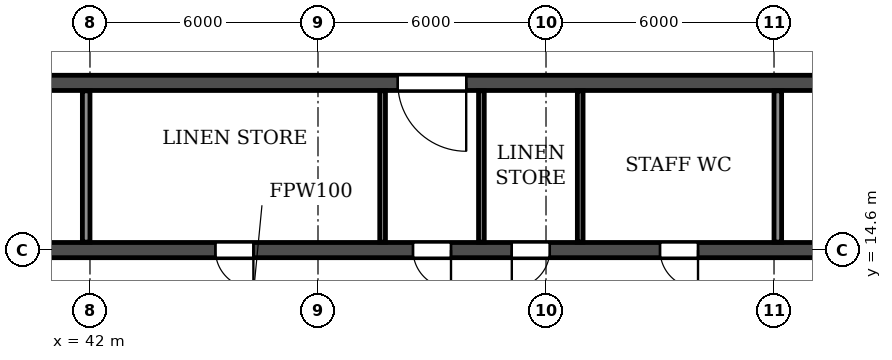
"""IFC4 building model, lengths in metres.
Left out: names, types, materials, properties, quantities, classifications, styles, units other than length and angle.
Written with IfcOpenShell. Run it as: python <this file> out.ifc"""

import sys

from ifc_helpers import new_model, si_unit, direction, frame, frame_2d, origin, place, context, subcontext, project, spatial, rectangle, extrude, element, fill, save


model = new_model("IFC4")
c1 = context("Model", 3, precision=1e-05, world=origin(), true_north=direction((0.0, 1.0)))
c2 = subcontext(c1, "Body", "Model", "MODEL_VIEW")
j1 = project(units=[si_unit("LENGTHUNIT", "METRE"), si_unit("PLANEANGLEUNIT", "RADIAN")], contexts=[c1])
p1 = place(None, origin())
s1 = spatial("IfcSite", under=j1, at=p1, CompositionType="ELEMENT")
p2 = place(p1, origin())
s2 = spatial("IfcBuilding", under=s1, at=p2, CompositionType="ELEMENT")
p3 = place(p2, frame((0.0, 0.0, 208.2)))
s3 = spatial("IfcBuildingStorey", under=s2, at=p3, CompositionType="ELEMENT", Elevation=208.2)
p4 = place(p3, frame((18.2, 14.6, 0.0), z_axis=(0.0, 0.0, 1.0), x_axis=(1.0, 0.0, 0.0)))
e1 = element("IfcWall", 1, at=p4, inside=s3, PredefinedType="SOLIDWALL", context=c2, shape_type="SweptSolid", body=[
    extrude(rectangle(XDim=65.6, YDim=0.4, at=frame_2d((32.8, 0.0))), origin(), (0.0, 0.0, 1.0), 3.0),
])
p5 = place(p4, frame((0.7, 0.0, 0.0)))
e2 = element("IfcOpeningElement", 2, at=p5, cuts=e1, PredefinedType="OPENING", context=c2, shape_type="SweptSolid", body=[
    extrude(rectangle(XDim=1.0, YDim=2.1, at=frame_2d((0.5, 1.05))), frame((0.0, 0.21, 0.0), z_axis=(0.0, -1.0, 0.0), x_axis=(1.0, 0.0, 0.0)), (0.0, 0.0, 1.0), 0.42),
])
p6 = place(p4, frame((8.6, 0.0, 0.0)))
e3 = element("IfcOpeningElement", 3, at=p6, cuts=e1, PredefinedType="OPENING", context=c2, shape_type="SweptSolid", body=[
    extrude(rectangle(XDim=1.0, YDim=2.1, at=frame_2d((0.5, 1.05))), frame((0.0, 0.21, 0.0), z_axis=(0.0, -1.0, 0.0), x_axis=(1.0, 0.0, 0.0)), (0.0, 0.0, 1.0), 0.42),
])
p7 = place(p4, frame((13.2, 0.0, 0.0)))
e4 = element("IfcOpeningElement", 4, at=p7, cuts=e1, PredefinedType="OPENING", context=c2, shape_type="SweptSolid", body=[
    extrude(rectangle(XDim=1.0, YDim=2.1, at=frame_2d((0.5, 1.05))), frame((0.0, 0.21, 0.0), z_axis=(0.0, -1.0, 0.0), x_axis=(1.0, 0.0, 0.0)), (0.0, 0.0, 1.0), 0.42),
])
p8 = place(p4, frame((27.1, 0.0, 0.0)))
e5 = element("IfcOpeningElement", 5, at=p8, cuts=e1, PredefinedType="OPENING", context=c2, shape_type="SweptSolid", body=[
    extrude(rectangle(XDim=1.0, YDim=2.1, at=frame_2d((0.5, 1.05))), frame((0.0, 0.21, 0.0), z_axis=(0.0, -1.0, 0.0), x_axis=(1.0, 0.0, 0.0)), (0.0, 0.0, 1.0), 0.42),
])
p9 = place(p4, frame((32.3, 0.0, 0.0)))
e6 = element("IfcOpeningElement", 6, at=p9, cuts=e1, PredefinedType="OPENING", context=c2, shape_type="SweptSolid", body=[
    extrude(rectangle(XDim=1.0, YDim=2.1, at=frame_2d((0.5, 1.05))), frame((0.0, 0.21, 0.0), z_axis=(0.0, -1.0, 0.0), x_axis=(1.0, 0.0, 0.0)), (0.0, 0.0, 1.0), 0.42),
])
p10 = place(p4, frame((34.9, 0.0, 0.0)))
e7 = element("IfcOpeningElement", 7, at=p10, cuts=e1, PredefinedType="OPENING", context=c2, shape_type="SweptSolid", body=[
    extrude(rectangle(XDim=1.0, YDim=2.1, at=frame_2d((0.5, 1.05))), frame((0.0, 0.21, 0.0), z_axis=(0.0, -1.0, 0.0), x_axis=(1.0, 0.0, 0.0)), (0.0, 0.0, 1.0), 0.42),
])
p11 = place(p4, frame((38.8, 0.0, 0.0)))
e8 = element("IfcOpeningElement", 8, at=p11, cuts=e1, PredefinedType="OPENING", context=c2, shape_type="SweptSolid", body=[
    extrude(rectangle(XDim=1.0, YDim=2.1, at=frame_2d((0.5, 1.05))), frame((0.0, 0.21, 0.0), z_axis=(0.0, -1.0, 0.0), x_axis=(1.0, 0.0, 0.0)), (0.0, 0.0, 1.0), 0.42),
])
p12 = place(p4, frame((51.4, 0.0, 0.0)))
e9 = element("IfcOpeningElement", 9, at=p12, cuts=e1, PredefinedType="OPENING", context=c2, shape_type="SweptSolid", body=[
    extrude(rectangle(XDim=1.0, YDim=2.1, at=frame_2d((0.5, 1.05))), frame((0.0, 0.21, 0.0), z_axis=(0.0, -1.0, 0.0), x_axis=(1.0, 0.0, 0.0)), (0.0, 0.0, 1.0), 0.42),
])
p13 = place(p4, frame((56.0, 0.0, 0.0)))
e10 = element("IfcOpeningElement", 10, at=p13, cuts=e1, PredefinedType="OPENING", context=c2, shape_type="SweptSolid", body=[
    extrude(rectangle(XDim=1.0, YDim=2.1, at=frame_2d((0.5, 1.05))), frame((0.0, 0.21, 0.0), z_axis=(0.0, -1.0, 0.0), x_axis=(1.0, 0.0, 0.0)), (0.0, 0.0, 1.0), 0.42),
])
p14 = place(p4, frame((63.9, 0.0, 0.0)))
e11 = element("IfcOpeningElement", 11, at=p14, cuts=e1, PredefinedType="OPENING", context=c2, shape_type="SweptSolid", body=[
    extrude(rectangle(XDim=1.0, YDim=2.1, at=frame_2d((0.5, 1.05))), frame((0.0, 0.21, 0.0), z_axis=(0.0, -1.0, 0.0), x_axis=(1.0, 0.0, 0.0)), (0.0, 0.0, 1.0), 0.42),
])
p15 = place(p3, frame((33.925, 19.0, 0.0), z_axis=(0.0, 0.0, 1.0), x_axis=(1.0, 0.0, 0.0)))
e12 = element("IfcWall", 12, at=p15, inside=s3, PredefinedType="SOLIDWALL", context=c2, shape_type="SweptSolid", body=[
    extrude(rectangle(XDim=34.15, YDim=0.4, at=frame_2d((17.075, 0.0))), origin(), (0.0, 0.0, 1.0), 3.0),
])
p16 = place(p15, frame((16.175, 0.0, 0.0)))
e13 = element("IfcOpeningElement", 13, at=p16, cuts=e12, PredefinedType="OPENING", context=c2, shape_type="SweptSolid", body=[
    extrude(rectangle(XDim=1.8, YDim=2.1, at=frame_2d((0.9, 1.05))), frame((0.0, 0.21, 0.0), z_axis=(0.0, -1.0, 0.0), x_axis=(1.0, 0.0, 0.0)), (0.0, 0.0, 1.0), 0.42),
])
p17 = place(p15, frame((1.525, 0.0, 0.0)))
e14 = element("IfcOpeningElement", 14, at=p17, cuts=e12, PredefinedType="OPENING", context=c2, shape_type="SweptSolid", body=[
    extrude(rectangle(XDim=1.8, YDim=2.1, at=frame_2d((0.9, 1.05))), frame((0.0, 0.21, 0.0), z_axis=(0.0, -1.0, 0.0), x_axis=(1.0, 0.0, 0.0)), (0.0, 0.0, 1.0), 0.42),
])
p18 = place(p15, frame((30.825, 0.0, 0.0)))
e15 = element("IfcOpeningElement", 15, at=p18, cuts=e12, PredefinedType="OPENING", context=c2, shape_type="SweptSolid", body=[
    extrude(rectangle(XDim=1.8, YDim=2.1, at=frame_2d((0.9, 1.05))), frame((0.0, 0.21, 0.0), z_axis=(0.0, -1.0, 0.0), x_axis=(1.0, 0.0, 0.0)), (0.0, 0.0, 1.0), 0.42),
])
for number, where, z_axis, x_axis in (
    (16, (49.7, 14.81, 0.0), (0.0, 0.0, 1.0), (0.0, 1.0, 0.0)),
    (17, (52.3, 14.81, 0.0), (0.0, 0.0, 1.0), (0.0, 1.0, 0.0)),
    (18, (54.9, 14.81, 0.0), (0.0, 0.0, 1.0), (0.0, 1.0, 0.0)),
):
    element("IfcWall", number, at=place(p3, frame(where, z_axis=z_axis, x_axis=x_axis)), inside=s3, PredefinedType="PARTITIONING", context=c2, shape_type="SweptSolid", body=[
        extrude(rectangle(XDim=3.98, YDim=0.15, at=frame_2d((1.99, 0.0))), origin(), (0.0, 0.0, 1.0), 3.0),
    ])
for number, where, z_axis, x_axis in (
    (19, (41.9, 14.81, 0.0), (0.0, 0.0, 1.0), (0.0, 1.0, 0.0)),
    (20, (60.1, 14.81, 0.0), (0.0, 0.0, 1.0), (0.0, 1.0, 0.0)),
):
    element("IfcWall", number, at=place(p3, frame(where, z_axis=z_axis, x_axis=x_axis)), inside=s3, PredefinedType="PARTITIONING", context=c2, shape_type="SweptSolid", body=[
        extrude(rectangle(XDim=3.98, YDim=0.2, at=frame_2d((1.99, 0.0))), origin(), (0.0, 0.0, 1.0), 3.0),
    ])
p19 = place(p8, frame((1.0, 0.0, 0.0), z_axis=(0.0, 0.0, 1.0), x_axis=(-1.0, 0.0, 0.0)))
e21 = element("IfcDoor", 21, at=p19, inside=s3, OperationType="SINGLE_SWING_LEFT", PredefinedType="DOOR", context=c2, shape_type="SweptSolid", body=[
    extrude(rectangle(XDim=1.0, YDim=2.1, at=frame_2d((0.5, 1.05))), frame((0.0, 0.025, 0.0), z_axis=(0.0, -1.0, 0.0), x_axis=(1.0, 0.0, 0.0)), (0.0, 0.0, 1.0), 0.05),
])
fill(e5, e21)
p20 = place(p9, frame((1.0, 0.0, 0.0), z_axis=(0.0, 0.0, 1.0), x_axis=(-1.0, 0.0, 0.0)))
e22 = element("IfcDoor", 22, at=p20, inside=s3, OperationType="SINGLE_SWING_LEFT", PredefinedType="DOOR", context=c2, shape_type="SweptSolid", body=[
    extrude(rectangle(XDim=1.0, YDim=2.1, at=frame_2d((0.5, 1.05))), frame((0.0, 0.025, 0.0), z_axis=(0.0, -1.0, 0.0), x_axis=(1.0, 0.0, 0.0)), (0.0, 0.0, 1.0), 0.05),
])
fill(e6, e22)
p21 = place(p10, frame((1.0, 0.0, 0.0), z_axis=(0.0, 0.0, 1.0), x_axis=(-1.0, 0.0, 0.0)))
e23 = element("IfcDoor", 23, at=p21, inside=s3, OperationType="SINGLE_SWING_RIGHT", PredefinedType="DOOR", context=c2, shape_type="SweptSolid", body=[
    extrude(rectangle(XDim=1.0, YDim=2.1, at=frame_2d((0.5, 1.05))), frame((0.0, 0.025, 0.0), z_axis=(0.0, -1.0, 0.0), x_axis=(1.0, 0.0, 0.0)), (0.0, 0.0, 1.0), 0.05),
])
fill(e7, e23)
p22 = place(p11, frame((1.0, 0.0, 0.0), z_axis=(0.0, 0.0, 1.0), x_axis=(-1.0, 0.0, 0.0)))
e24 = element("IfcDoor", 24, at=p22, inside=s3, OperationType="SINGLE_SWING_LEFT", PredefinedType="DOOR", context=c2, shape_type="SweptSolid", body=[
    extrude(rectangle(XDim=1.0, YDim=2.1, at=frame_2d((0.5, 1.05))), frame((0.0, 0.025, 0.0), z_axis=(0.0, -1.0, 0.0), x_axis=(1.0, 0.0, 0.0)), (0.0, 0.0, 1.0), 0.05),
])
fill(e8, e24)
p23 = place(p16, frame((1.8, 0.0, 0.0), z_axis=(0.0, 0.0, 1.0), x_axis=(-1.0, 0.0, 0.0)))
e25 = element("IfcDoor", 25, at=p23, inside=s3, OperationType="DOUBLE_DOOR_SINGLE_SWING", PredefinedType="DOOR", context=c2, shape_type="SweptSolid", body=[
    extrude(rectangle(XDim=1.8, YDim=2.1, at=frame_2d((0.9, 1.05))), frame((0.0, 0.025, 0.0), z_axis=(0.0, -1.0, 0.0), x_axis=(1.0, 0.0, 0.0)), (0.0, 0.0, 1.0), 0.05),
])
fill(e13, e25)
save(model, sys.argv[1])
